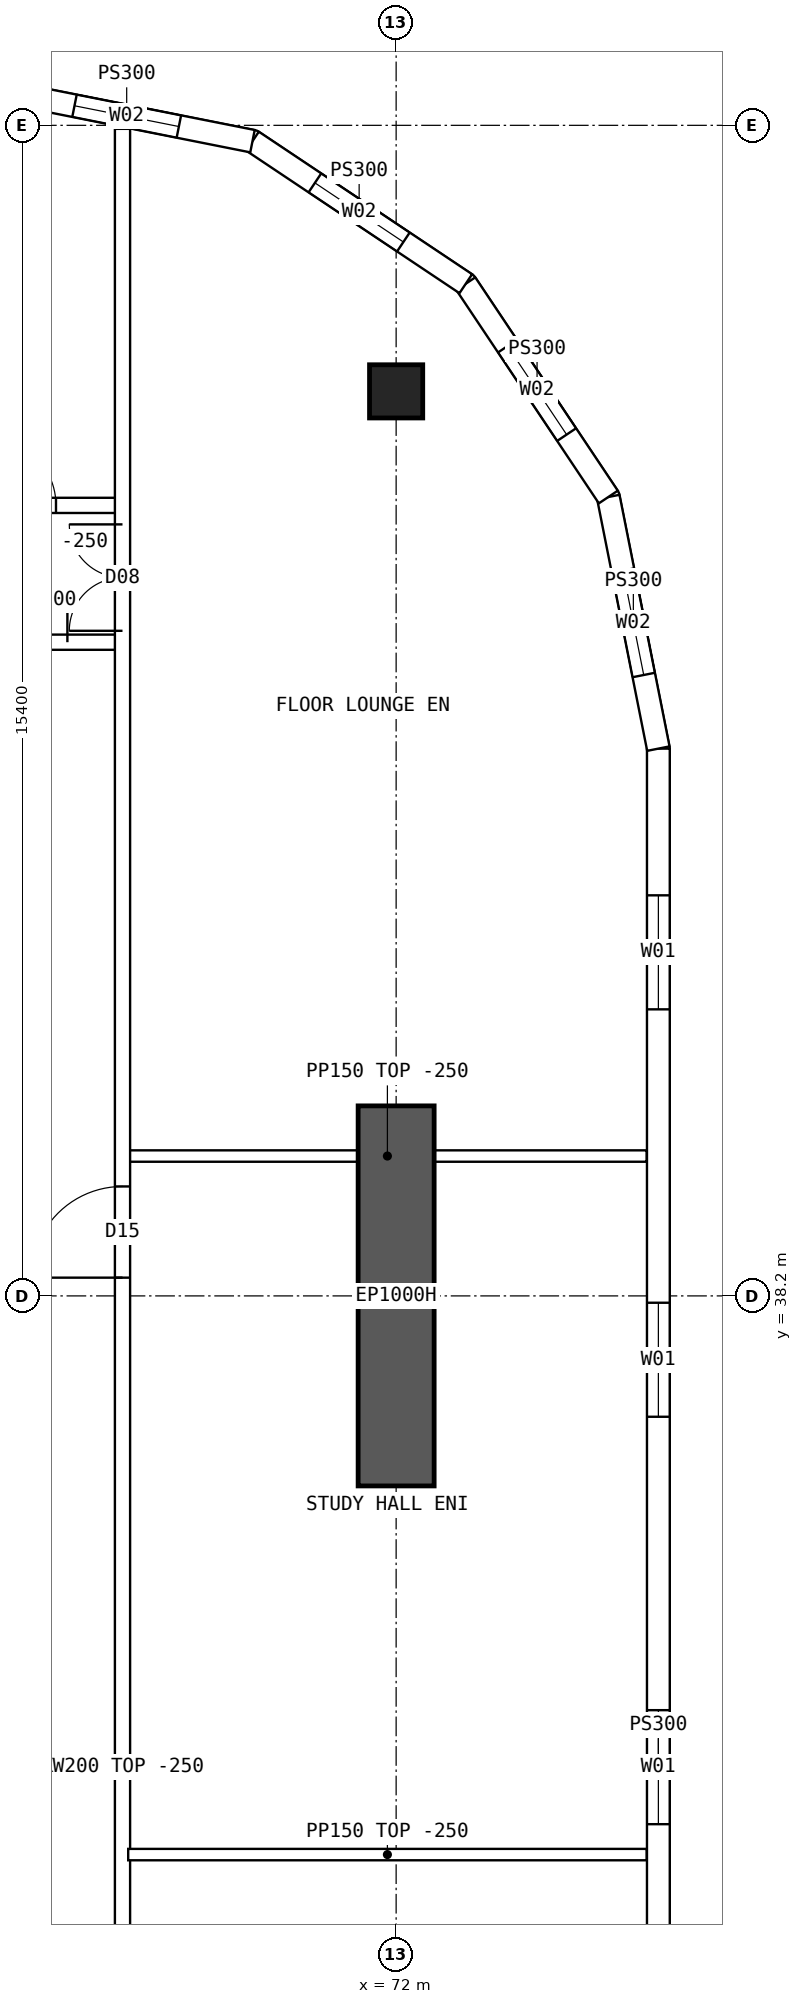
"""IFC4 building model, lengths in metres.
Left out: names, types, materials, properties, quantities, classifications, styles, units other than length and angle.
Written with IfcOpenShell. Run it as: python <this file> out.ifc"""

import sys

from ifc_helpers import new_model, si_unit, direction, frame, frame_2d, origin, origin_2d, place, context, subcontext, project, spatial, polyline, rectangle, hollow_rectangle, outline, extrude, element, fill, save


model = new_model("IFC4")
c1 = context("Model", 3, precision=1e-05, world=origin(), true_north=direction((0.0, 1.0)))
c2 = subcontext(c1, "Body", "Model", "MODEL_VIEW")
j1 = project(units=[si_unit("LENGTHUNIT", "METRE"), si_unit("PLANEANGLEUNIT", "RADIAN")], contexts=[c1])
p1 = place(None, origin())
s1 = spatial("IfcSite", under=j1, at=p1, CompositionType="ELEMENT")
p2 = place(p1, origin())
s2 = spatial("IfcBuilding", under=s1, at=p2, CompositionType="ELEMENT")
p3 = place(p2, frame((0.0, 0.0, 193.6)))
s3 = spatial("IfcBuildingStorey", under=s2, at=p3, CompositionType="ELEMENT", Elevation=193.6)
p4 = place(p3, frame((72.0, 50.1, 0.0), z_axis=(0.0, 0.0, 1.0), x_axis=(1.0, 0.0, 0.0)))
e1 = element("IfcColumn", 1, at=p4, inside=s3, PredefinedType="COLUMN", context=c2, shape_type="SweptSolid", body=[
    extrude(hollow_rectangle(XDim=0.7, YDim=0.7, WallThickness=0.07, at=origin_2d()), origin(), (0.0, 0.0, 1.0), 3.75),
])
p5 = place(p3, frame((72.0, 35.7, 0.0), z_axis=(0.0, 0.0, 1.0), x_axis=(0.0, 1.0, 0.0)))
e2 = element("IfcWall", 2, at=p5, inside=s3, PredefinedType="SHEAR", context=c2, shape_type="SweptSolid", body=[
    extrude(rectangle(XDim=5.0, YDim=1.0, at=frame_2d((2.5, 0.0))), origin(), (0.0, 0.0, 1.0), 3.75),
])
p6 = place(p3, frame((75.45, 18.6, 0.0), z_axis=(0.0, 0.0, 1.0), x_axis=(0.0, 1.0, 0.0)))
e3 = element("IfcWall", 3, at=p6, inside=s3, PredefinedType="SOLIDWALL", context=c2, shape_type="SweptSolid", body=[
    extrude(outline(polyline([(-0.015, -0.15), (26.815, -0.15), (26.785, 0.15), (0.015, 0.15), (-0.015, -0.15)])), origin(), (0.0, 0.0, 1.0), 3.5),
])
p7 = place(p6, frame((1.93, 0.0, 0.9)))
e4 = element("IfcOpeningElement", 4, at=p7, cuts=e3, PredefinedType="OPENING", context=c2, shape_type="SweptSolid", body=[
    extrude(rectangle(XDim=1.5, YDim=2.0, at=frame_2d((0.75, 1.0))), frame((0.0, 0.16, 0.0), z_axis=(0.0, -1.0, 0.0), x_axis=(1.0, 0.0, 0.0)), (0.0, 0.0, 1.0), 0.32),
])
p8 = place(p6, frame((7.29, 0.0, 0.9)))
e5 = element("IfcOpeningElement", 5, at=p8, cuts=e3, PredefinedType="OPENING", context=c2, shape_type="SweptSolid", body=[
    extrude(rectangle(XDim=1.5, YDim=2.0, at=frame_2d((0.75, 1.0))), frame((0.0, 0.16, 0.0), z_axis=(0.0, -1.0, 0.0), x_axis=(1.0, 0.0, 0.0)), (0.0, 0.0, 1.0), 0.32),
])
p9 = place(p6, frame((12.65, 0.0, 0.9)))
e6 = element("IfcOpeningElement", 6, at=p9, cuts=e3, PredefinedType="OPENING", context=c2, shape_type="SweptSolid", body=[
    extrude(rectangle(XDim=1.5, YDim=2.0, at=frame_2d((0.75, 1.0))), frame((0.0, 0.16, 0.0), z_axis=(0.0, -1.0, 0.0), x_axis=(1.0, 0.0, 0.0)), (0.0, 0.0, 1.0), 0.32),
])
p10 = place(p6, frame((18.01, 0.0, 0.9)))
e7 = element("IfcOpeningElement", 7, at=p10, cuts=e3, PredefinedType="OPENING", context=c2, shape_type="SweptSolid", body=[
    extrude(rectangle(XDim=1.5, YDim=2.0, at=frame_2d((0.75, 1.0))), frame((0.0, 0.16, 0.0), z_axis=(0.0, -1.0, 0.0), x_axis=(1.0, 0.0, 0.0)), (0.0, 0.0, 1.0), 0.32),
])
p11 = place(p6, frame((23.37, 0.0, 0.9)))
e8 = element("IfcOpeningElement", 8, at=p11, cuts=e3, PredefinedType="OPENING", context=c2, shape_type="SweptSolid", body=[
    extrude(rectangle(XDim=1.5, YDim=2.0, at=frame_2d((0.75, 1.0))), frame((0.0, 0.16, 0.0), z_axis=(0.0, -1.0, 0.0), x_axis=(1.0, 0.0, 0.0)), (0.0, 0.0, 1.0), 0.32),
])
p12 = place(p3, frame((75.45, 45.4, 0.0), z_axis=(0.0, 0.0, 1.0), x_axis=(-0.19508664885, 0.980786011034, 0.0)))
e9 = element("IfcWall", 9, at=p12, inside=s3, PredefinedType="SOLIDWALL", context=c2, shape_type="SweptSolid", body=[
    extrude(outline(polyline([(-0.015, -0.15), (3.405, -0.15), (3.345, 0.15), (0.015, 0.15), (-0.015, -0.15)])), origin(), (0.0, 0.0, 1.0), 3.5),
])
p13 = place(p12, frame((0.988, 0.0, 0.9)))
e10 = element("IfcOpeningElement", 10, at=p13, cuts=e9, PredefinedType="OPENING", context=c2, shape_type="SweptSolid", body=[
    extrude(rectangle(XDim=1.4, YDim=1.8, at=frame_2d((0.7, 0.9))), frame((0.0, 0.16, 0.0), z_axis=(0.0, -1.0, 0.0), x_axis=(1.0, 0.0, 0.0)), (0.0, 0.0, 1.0), 0.32),
])
p14 = place(p3, frame((74.792, 48.71, 0.0), z_axis=(0.0, 0.0, 1.0), x_axis=(-0.555534554399, 0.831493450887, 0.0)))
e11 = element("IfcWall", 11, at=p14, inside=s3, PredefinedType="SOLIDWALL", context=c2, shape_type="SweptSolid", body=[
    extrude(outline(polyline([(-0.03, -0.15), (3.405, -0.15), (3.345, 0.15), (0.03, 0.15), (-0.03, -0.15)])), origin(), (0.0, 0.0, 1.0), 3.5),
])
p15 = place(p14, frame((0.988, 0.0, 0.9)))
e12 = element("IfcOpeningElement", 12, at=p15, cuts=e11, PredefinedType="OPENING", context=c2, shape_type="SweptSolid", body=[
    extrude(rectangle(XDim=1.4, YDim=1.8, at=frame_2d((0.7, 0.9))), frame((0.0, 0.16, 0.0), z_axis=(0.0, -1.0, 0.0), x_axis=(1.0, 0.0, 0.0)), (0.0, 0.0, 1.0), 0.32),
])
p16 = place(p3, frame((72.917, 51.517, 0.0), z_axis=(0.0, 0.0, 1.0), x_axis=(-0.831493450887, 0.555534554399, 0.0)))
e13 = element("IfcWall", 13, at=p16, inside=s3, PredefinedType="SOLIDWALL", context=c2, shape_type="SweptSolid", body=[
    extrude(outline(polyline([(-0.03, -0.15), (3.405, -0.15), (3.345, 0.15), (0.03, 0.15), (-0.03, -0.15)])), origin(), (0.0, 0.0, 1.0), 3.5),
])
p17 = place(p16, frame((0.988, 0.0, 0.9)))
e14 = element("IfcOpeningElement", 14, at=p17, cuts=e13, PredefinedType="OPENING", context=c2, shape_type="SweptSolid", body=[
    extrude(rectangle(XDim=1.4, YDim=1.8, at=frame_2d((0.7, 0.9))), frame((0.0, 0.16, 0.0), z_axis=(0.0, -1.0, 0.0), x_axis=(1.0, 0.0, 0.0)), (0.0, 0.0, 1.0), 0.32),
])
p18 = place(p3, frame((70.11, 53.392, 0.0), z_axis=(0.0, 0.0, 1.0), x_axis=(-0.98078325777, 0.195100490205, 0.0)))
e15 = element("IfcWall", 15, at=p18, inside=s3, PredefinedType="SOLIDWALL", context=c2, shape_type="SweptSolid", body=[
    extrude(outline(polyline([(-0.03, -0.15), (3.405, -0.15), (3.345, 0.15), (0.03, 0.15), (-0.03, -0.15)])), origin(), (0.0, 0.0, 1.0), 3.5),
])
p19 = place(p18, frame((0.988, 0.0, 0.9)))
e16 = element("IfcOpeningElement", 16, at=p19, cuts=e15, PredefinedType="OPENING", context=c2, shape_type="SweptSolid", body=[
    extrude(rectangle(XDim=1.4, YDim=1.8, at=frame_2d((0.7, 0.9))), frame((0.0, 0.16, 0.0), z_axis=(0.0, -1.0, 0.0), x_axis=(1.0, 0.0, 0.0)), (0.0, 0.0, 1.0), 0.32),
])
p20 = place(p3, frame((66.425, 48.6, 0.0), z_axis=(0.0, 0.0, 1.0), x_axis=(1.0, 0.0, 0.0)))
e17 = element("IfcWall", 17, at=p20, inside=s3, PredefinedType="SOLIDWALL", context=c2, shape_type="SweptSolid", body=[
    extrude(rectangle(XDim=1.975, YDim=0.2, at=frame_2d((0.987, 0.0))), origin(), (0.0, 0.0, 1.0), 3.5),
])
p21 = place(p20, frame((0.2, 0.0, 0.0)))
e18 = element("IfcOpeningElement", 18, at=p21, cuts=e17, PredefinedType="OPENING", context=c2, shape_type="SweptSolid", body=[
    extrude(rectangle(XDim=0.9, YDim=2.1, at=frame_2d((0.45, 1.05))), frame((0.0, 0.11, 0.0), z_axis=(0.0, -1.0, 0.0), x_axis=(1.0, 0.0, 0.0)), (0.0, 0.0, 1.0), 0.22),
])
p22 = place(p3, frame((66.425, 46.8, 0.0), z_axis=(0.0, 0.0, 1.0), x_axis=(1.0, 0.0, 0.0)))
e19 = element("IfcWall", 19, at=p22, inside=s3, PredefinedType="SOLIDWALL", context=c2, shape_type="SweptSolid", body=[
    extrude(rectangle(XDim=1.975, YDim=0.2, at=frame_2d((0.987, 0.0))), origin(), (0.0, 0.0, 1.0), 3.5),
])
p23 = place(p22, frame((0.05, 0.0, 0.0)))
e20 = element("IfcOpeningElement", 20, at=p23, cuts=e19, PredefinedType="OPENING", context=c2, shape_type="SweptSolid", body=[
    extrude(rectangle(XDim=1.2, YDim=2.1, at=frame_2d((0.6, 1.05))), frame((0.0, 0.11, 0.0), z_axis=(0.0, -1.0, 0.0), x_axis=(1.0, 0.0, 0.0)), (0.0, 0.0, 1.0), 0.22),
])
p24 = place(p3, frame((68.475, 30.85, 0.0), z_axis=(0.0, 0.0, 1.0), x_axis=(1.0, 0.0, 0.0)))
e21 = element("IfcWall", 21, at=p24, inside=s3, PredefinedType="PARTITIONING", context=c2, shape_type="SweptSolid", body=[
    extrude(outline(polyline([(0.0, 0.0), (6.82, 0.0), (6.82, 3.5), (3.827, 3.5), (3.825, 3.05), (3.227, 3.05), (3.225, 3.5), (0.0, 3.5), (0.0, 0.0)])), frame((0.0, 0.075, 0.0), z_axis=(0.0, -1.0, 0.0), x_axis=(1.0, 0.0, 0.0)), (0.0, 0.0, 1.0), 0.15),
])
p25 = place(p3, frame((68.4, 10.446, 0.0), z_axis=(0.0, 0.0, 1.0), x_axis=(0.0, 1.0, 0.0)))
e22 = element("IfcWall", 22, at=p25, inside=s3, PredefinedType="SOLIDWALL", context=c2, shape_type="SweptSolid", body=[
    extrude(rectangle(XDim=43.107, YDim=0.2, at=frame_2d((21.554, 0.0))), origin(), (0.0, 0.0, 1.0), 3.5),
])
p26 = place(p25, frame((27.994, 0.0, 0.0)))
e23 = element("IfcOpeningElement", 23, at=p26, cuts=e22, PredefinedType="OPENING", context=c2, shape_type="SweptSolid", body=[
    extrude(rectangle(XDim=1.2, YDim=2.1, at=frame_2d((0.6, 1.05))), frame((0.0, 0.11, 0.0), z_axis=(0.0, -1.0, 0.0), x_axis=(1.0, 0.0, 0.0)), (0.0, 0.0, 1.0), 0.22),
])
p27 = place(p25, frame((5.104, 0.0, 0.0)))
e24 = element("IfcOpeningElement", 24, at=p27, cuts=e22, PredefinedType="OPENING", context=c2, shape_type="SweptSolid", body=[
    extrude(rectangle(XDim=1.4, YDim=2.1, at=frame_2d((0.7, 1.05))), frame((0.0, 0.11, 0.0), z_axis=(0.0, -1.0, 0.0), x_axis=(1.0, 0.0, 0.0)), (0.0, 0.0, 1.0), 0.22),
])
p28 = place(p25, frame((36.504, 0.0, 0.0)))
e25 = element("IfcOpeningElement", 25, at=p28, cuts=e22, PredefinedType="OPENING", context=c2, shape_type="SweptSolid", body=[
    extrude(rectangle(XDim=1.4, YDim=2.1, at=frame_2d((0.7, 1.05))), frame((0.0, 0.11, 0.0), z_axis=(0.0, -1.0, 0.0), x_axis=(1.0, 0.0, 0.0)), (0.0, 0.0, 1.0), 0.22),
])
p29 = place(p3, frame((68.475, 40.04, 0.0), z_axis=(0.0, 0.0, 1.0), x_axis=(1.0, 0.0, 0.0)))
e26 = element("IfcWall", 26, at=p29, inside=s3, PredefinedType="PARTITIONING", context=c2, shape_type="SweptSolid", body=[
    extrude(rectangle(XDim=6.82, YDim=0.15, at=frame_2d((3.41, 0.0))), origin(), (0.0, 0.0, 1.0), 3.5),
])
p30 = place(p9, origin())
e27 = element("IfcWindow", 27, at=p30, inside=s3, PartitioningType="SINGLE_PANEL", PredefinedType="WINDOW", context=c2, shape_type="SweptSolid", body=[
    extrude(rectangle(XDim=1.5, YDim=2.0, at=frame_2d((0.75, 1.0))), frame((0.0, 0.03, 0.0), z_axis=(0.0, -1.0, 0.0), x_axis=(1.0, 0.0, 0.0)), (0.0, 0.0, 1.0), 0.06),
])
fill(e6, e27)
p31 = place(p10, origin())
e28 = element("IfcWindow", 28, at=p31, inside=s3, PartitioningType="SINGLE_PANEL", PredefinedType="WINDOW", context=c2, shape_type="SweptSolid", body=[
    extrude(rectangle(XDim=1.5, YDim=2.0, at=frame_2d((0.75, 1.0))), frame((0.0, 0.03, 0.0), z_axis=(0.0, -1.0, 0.0), x_axis=(1.0, 0.0, 0.0)), (0.0, 0.0, 1.0), 0.06),
])
fill(e7, e28)
p32 = place(p11, origin())
e29 = element("IfcWindow", 29, at=p32, inside=s3, PartitioningType="SINGLE_PANEL", PredefinedType="WINDOW", context=c2, shape_type="SweptSolid", body=[
    extrude(rectangle(XDim=1.5, YDim=2.0, at=frame_2d((0.75, 1.0))), frame((0.0, 0.03, 0.0), z_axis=(0.0, -1.0, 0.0), x_axis=(1.0, 0.0, 0.0)), (0.0, 0.0, 1.0), 0.06),
])
fill(e8, e29)
p33 = place(p13, origin())
e30 = element("IfcWindow", 30, at=p33, inside=s3, PartitioningType="SINGLE_PANEL", PredefinedType="WINDOW", context=c2, shape_type="SweptSolid", body=[
    extrude(rectangle(XDim=1.4, YDim=1.8, at=frame_2d((0.7, 0.9))), frame((0.0, 0.03, 0.0), z_axis=(0.0, -1.0, 0.0), x_axis=(1.0, 0.0, 0.0)), (0.0, 0.0, 1.0), 0.06),
])
fill(e10, e30)
p34 = place(p15, origin())
e31 = element("IfcWindow", 31, at=p34, inside=s3, PartitioningType="SINGLE_PANEL", PredefinedType="WINDOW", context=c2, shape_type="SweptSolid", body=[
    extrude(rectangle(XDim=1.4, YDim=1.8, at=frame_2d((0.7, 0.9))), frame((0.0, 0.03, 0.0), z_axis=(0.0, -1.0, 0.0), x_axis=(1.0, 0.0, 0.0)), (0.0, 0.0, 1.0), 0.06),
])
fill(e12, e31)
p35 = place(p17, origin())
e32 = element("IfcWindow", 32, at=p35, inside=s3, PartitioningType="SINGLE_PANEL", PredefinedType="WINDOW", context=c2, shape_type="SweptSolid", body=[
    extrude(rectangle(XDim=1.4, YDim=1.8, at=frame_2d((0.7, 0.9))), frame((0.0, 0.03, 0.0), z_axis=(0.0, -1.0, 0.0), x_axis=(1.0, 0.0, 0.0)), (0.0, 0.0, 1.0), 0.06),
])
fill(e14, e32)
p36 = place(p19, origin())
e33 = element("IfcWindow", 33, at=p36, inside=s3, PartitioningType="SINGLE_PANEL", PredefinedType="WINDOW", context=c2, shape_type="SweptSolid", body=[
    extrude(rectangle(XDim=1.4, YDim=1.8, at=frame_2d((0.7, 0.9))), frame((0.0, 0.03, 0.0), z_axis=(0.0, -1.0, 0.0), x_axis=(1.0, 0.0, 0.0)), (0.0, 0.0, 1.0), 0.06),
])
fill(e16, e33)
p37 = place(p23, origin())
e34 = element("IfcDoor", 34, at=p37, inside=s3, OperationType="DOUBLE_DOOR_SINGLE_SWING", PredefinedType="DOOR", context=c2, shape_type="SweptSolid", body=[
    extrude(rectangle(XDim=1.2, YDim=2.1, at=frame_2d((0.6, 1.05))), frame((0.0, 0.025, 0.0), z_axis=(0.0, -1.0, 0.0), x_axis=(1.0, 0.0, 0.0)), (0.0, 0.0, 1.0), 0.05),
])
fill(e20, e34)
p38 = place(p26, origin())
e35 = element("IfcDoor", 35, at=p38, inside=s3, OperationType="SINGLE_SWING_LEFT", PredefinedType="DOOR", context=c2, shape_type="SweptSolid", body=[
    extrude(rectangle(XDim=1.2, YDim=2.1, at=frame_2d((0.6, 1.05))), frame((0.0, 0.025, 0.0), z_axis=(0.0, -1.0, 0.0), x_axis=(1.0, 0.0, 0.0)), (0.0, 0.0, 1.0), 0.05),
])
fill(e23, e35)
p39 = place(p28, origin())
e36 = element("IfcDoor", 36, at=p39, inside=s3, OperationType="DOUBLE_DOOR_SINGLE_SWING", PredefinedType="DOOR", context=c2, shape_type="SweptSolid", body=[
    extrude(rectangle(XDim=1.4, YDim=2.1, at=frame_2d((0.7, 1.05))), frame((0.0, 0.025, 0.0), z_axis=(0.0, -1.0, 0.0), x_axis=(1.0, 0.0, 0.0)), (0.0, 0.0, 1.0), 0.05),
])
fill(e25, e36)
p40 = place(p21, origin())
e37 = element("IfcDoor", 37, at=p40, inside=s3, OperationType="SINGLE_SWING_LEFT", PredefinedType="DOOR", context=c2, shape_type="SweptSolid", body=[
    extrude(rectangle(XDim=0.9, YDim=2.1, at=frame_2d((0.45, 1.05))), frame((0.0, 0.025, 0.0), z_axis=(0.0, -1.0, 0.0), x_axis=(1.0, 0.0, 0.0)), (0.0, 0.0, 1.0), 0.05),
])
fill(e18, e37)
save(model, sys.argv[1])
